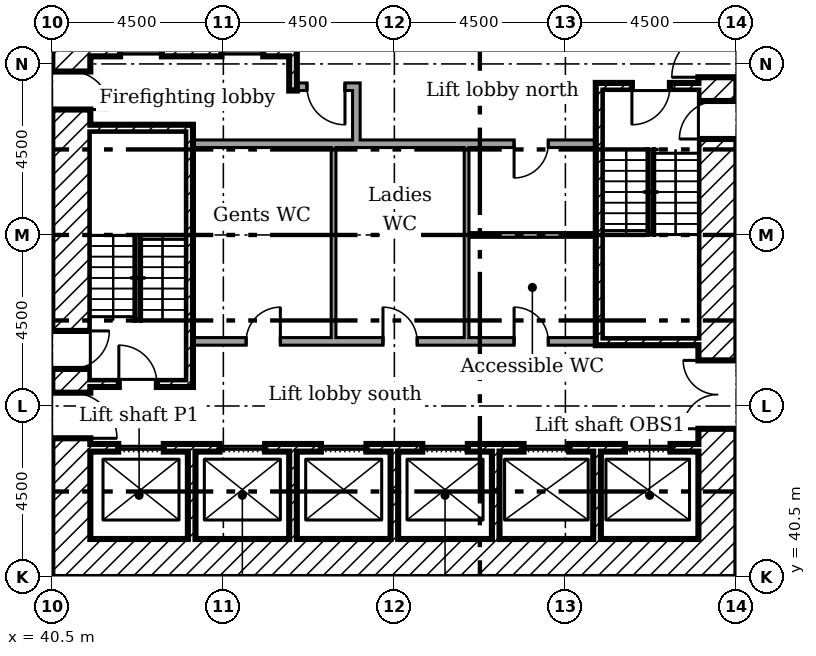
"""IFC4 building model, lengths in metres.
Left out: names, types, materials, properties, quantities, classifications, styles, units other than length and angle.
Written with IfcOpenShell. Run it as: python <this file> out.ifc"""

import sys

from ifc_helpers import new_model, si_unit, direction, frame, frame_2d, origin, place, context, subcontext, project, spatial, rectangle, extrude, element, fill, save


model = new_model("IFC4")
c1 = context("Model", 3, precision=1e-05, world=origin(), true_north=direction((0.0, 1.0)))
c2 = subcontext(c1, "Body", "Model", "MODEL_VIEW")
j1 = project(units=[si_unit("LENGTHUNIT", "METRE"), si_unit("PLANEANGLEUNIT", "RADIAN")], contexts=[c1])
p1 = place(None, origin())
s1 = spatial("IfcSite", under=j1, at=p1, CompositionType="ELEMENT")
p2 = place(p1, origin())
s2 = spatial("IfcBuilding", under=s1, at=p2, CompositionType="ELEMENT")
p3 = place(p2, origin())
s3 = spatial("IfcBuildingStorey", under=s2, at=p3, CompositionType="ELEMENT", Elevation=0.0)
p4 = place(p3, frame((58.0, 40.5, 0.0), z_axis=(0.0, 0.0, 1.0), x_axis=(0.0, 1.0, 0.0)))
e1 = element("IfcWall", 1, at=p4, inside=s3, PredefinedType="SHEAR", context=c2, shape_type="SweptSolid", body=[
    extrude(rectangle(XDim=18.0, YDim=1.0, at=frame_2d((9.0, 0.0))), origin(), (0.0, 0.0, 1.0), 5.5),
])
p5 = place(p4, frame((13.15, 0.0, 0.0)))
e2 = element("IfcOpeningElement", 2, at=p5, cuts=e1, PredefinedType="OPENING", context=c2, shape_type="SweptSolid", body=[
    extrude(rectangle(XDim=1.2, YDim=2.1, at=frame_2d((0.6, 1.05))), frame((0.0, 0.51, 0.0), z_axis=(0.0, -1.0, 0.0), x_axis=(1.0, 0.0, 0.0)), (0.0, 0.0, 1.0), 1.02),
])
p6 = place(p4, frame((3.9, 0.0, 0.0)))
e3 = element("IfcOpeningElement", 3, at=p6, cuts=e1, PredefinedType="OPENING", context=c2, shape_type="SweptSolid", body=[
    extrude(rectangle(XDim=1.8, YDim=2.1, at=frame_2d((0.9, 1.05))), frame((0.0, 0.51, 0.0), z_axis=(0.0, -1.0, 0.0), x_axis=(1.0, 0.0, 0.0)), (0.0, 0.0, 1.0), 1.02),
])
p7 = place(p4, frame((11.525, 0.0, 0.0)))
e4 = element("IfcOpeningElement", 4, at=p7, cuts=e1, PredefinedType="OPENING", context=c2, shape_type="SweptSolid", body=[
    extrude(rectangle(XDim=1.0, YDim=2.1, at=frame_2d((0.5, 1.05))), frame((0.0, 0.51, 0.0), z_axis=(0.0, -1.0, 0.0), x_axis=(1.0, 0.0, 0.0)), (0.0, 0.0, 1.0), 1.02),
])
p8 = place(p3, frame((41.5, 41.0, 0.0)))
e5 = element("IfcWall", 5, at=p8, inside=s3, PredefinedType="SHEAR", context=c2, shape_type="SweptSolid", body=[
    extrude(rectangle(XDim=16.0, YDim=1.0, at=frame_2d((8.0, 0.0))), origin(), (0.0, 0.0, 1.0), 5.5),
])
p9 = place(p3, frame((41.0, 40.5, 0.0), z_axis=(0.0, 0.0, 1.0), x_axis=(0.0, 1.0, 0.0)))
e6 = element("IfcWall", 6, at=p9, inside=s3, PredefinedType="SHEAR", context=c2, shape_type="SweptSolid", body=[
    extrude(rectangle(XDim=18.0, YDim=1.0, at=frame_2d((9.0, 0.0))), origin(), (0.0, 0.0, 1.0), 5.5),
])
p10 = place(p9, frame((3.65, 0.0, 0.0)))
e7 = element("IfcOpeningElement", 7, at=p10, cuts=e6, PredefinedType="OPENING", context=c2, shape_type="SweptSolid", body=[
    extrude(rectangle(XDim=1.2, YDim=2.1, at=frame_2d((0.6, 1.05))), frame((0.0, 0.51, 0.0), z_axis=(0.0, -1.0, 0.0), x_axis=(1.0, 0.0, 0.0)), (0.0, 0.0, 1.0), 1.02),
])
p11 = place(p9, frame((5.475, 0.0, 0.0)))
e8 = element("IfcOpeningElement", 8, at=p11, cuts=e6, PredefinedType="OPENING", context=c2, shape_type="SweptSolid", body=[
    extrude(rectangle(XDim=1.0, YDim=2.1, at=frame_2d((0.5, 1.05))), frame((0.0, 0.51, 0.0), z_axis=(0.0, -1.0, 0.0), x_axis=(1.0, 0.0, 0.0)), (0.0, 0.0, 1.0), 1.02),
])
p12 = place(p9, frame((12.3, 0.0, 0.0)))
e9 = element("IfcOpeningElement", 9, at=p12, cuts=e6, PredefinedType="OPENING", context=c2, shape_type="SweptSolid", body=[
    extrude(rectangle(XDim=1.0, YDim=2.1, at=frame_2d((0.5, 1.05))), frame((0.0, 0.51, 0.0), z_axis=(0.0, -1.0, 0.0), x_axis=(1.0, 0.0, 0.0)), (0.0, 0.0, 1.0), 1.02),
])
p13 = place(p3, frame((46.833, 57.5, 0.0), z_axis=(0.0, 0.0, 1.0), x_axis=(0.0, -1.0, 0.0)))
e10 = element("IfcWall", 10, at=p13, inside=s3, PredefinedType="SHEAR", context=c2, shape_type="SweptSolid", body=[
    extrude(rectangle(XDim=4.2, YDim=0.2, at=frame_2d((2.1, 0.0))), origin(), (0.0, 0.0, 1.0), 5.5),
])
for number, where, z_axis, x_axis in (
    (11, (44.167, 41.5, 0.0), (0.0, 0.0, 1.0), (0.0, 1.0, 0.0)),
    (12, (46.833, 41.5, 0.0), (0.0, 0.0, 1.0), (0.0, 1.0, 0.0)),
    (13, (49.5, 41.5, 0.0), (0.0, 0.0, 1.0), (0.0, 1.0, 0.0)),
    (14, (52.167, 41.5, 0.0), (0.0, 0.0, 1.0), (0.0, 1.0, 0.0)),
    (15, (54.833, 41.5, 0.0), (0.0, 0.0, 1.0), (0.0, 1.0, 0.0)),
):
    element("IfcWall", number, at=place(p3, frame(where, z_axis=z_axis, x_axis=x_axis)), inside=s3, PredefinedType="SHEAR", context=c2, shape_type="SweptSolid", body=[
        extrude(rectangle(XDim=2.3, YDim=0.2, at=frame_2d((1.15, 0.0))), origin(), (0.0, 0.0, 1.0), 5.5),
    ])
p14 = place(p3, frame((48.5, 51.9, 0.0), z_axis=(0.0, 0.0, 1.0), x_axis=(0.0, 1.0, 0.0)))
e16 = element("IfcWall", 16, at=p14, inside=s3, PredefinedType="PARTITIONING", context=c2, shape_type="SweptSolid", body=[
    extrude(rectangle(XDim=1.6, YDim=0.2, at=frame_2d((0.8, 0.0))), origin(), (0.0, 0.0, 1.0), 5.5),
])
p15 = place(p3, frame((46.933, 53.4, 0.0)))
e17 = element("IfcWall", 17, at=p15, inside=s3, PredefinedType="PARTITIONING", context=c2, shape_type="SweptSolid", body=[
    extrude(rectangle(XDim=1.467, YDim=0.2, at=frame_2d((0.733, 0.0))), origin(), (0.0, 0.0, 1.0), 5.5),
])
p16 = place(p15, frame((0.267, 0.0, 0.0)))
e18 = element("IfcOpeningElement", 18, at=p16, cuts=e17, PredefinedType="OPENING", context=c2, shape_type="SweptSolid", body=[
    extrude(rectangle(XDim=1.0, YDim=2.1, at=frame_2d((0.5, 1.05))), frame((0.0, 0.11, 0.0), z_axis=(0.0, -1.0, 0.0), x_axis=(1.0, 0.0, 0.0)), (0.0, 0.0, 1.0), 0.22),
])
p17 = place(p3, frame((41.5, 54.3, 0.0)))
e19 = element("IfcWall", 19, at=p17, inside=s3, PredefinedType="SHEAR", context=c2, shape_type="SweptSolid", body=[
    extrude(rectangle(XDim=5.233, YDim=0.2, at=frame_2d((2.617, 0.0))), origin(), (0.0, 0.0, 1.0), 5.5),
])
p18 = place(p17, frame((0.783, 0.0, 0.0)))
e20 = element("IfcOpeningElement", 20, at=p18, cuts=e19, PredefinedType="OPENING", context=c2, shape_type="SweptSolid", body=[
    extrude(rectangle(XDim=1.1, YDim=2.1, at=frame_2d((0.55, 1.05))), frame((0.0, 0.11, 0.0), z_axis=(0.0, -1.0, 0.0), x_axis=(1.0, 0.0, 0.0)), (0.0, 0.0, 1.0), 0.22),
])
p19 = place(p17, frame((3.45, 0.0, 0.0)))
e21 = element("IfcOpeningElement", 21, at=p19, cuts=e19, PredefinedType="OPENING", context=c2, shape_type="SweptSolid", body=[
    extrude(rectangle(XDim=1.1, YDim=2.1, at=frame_2d((0.55, 1.05))), frame((0.0, 0.11, 0.0), z_axis=(0.0, -1.0, 0.0), x_axis=(1.0, 0.0, 0.0)), (0.0, 0.0, 1.0), 0.22),
])
p20 = place(p3, frame((41.5, 43.9, 0.0)))
e22 = element("IfcWall", 22, at=p20, inside=s3, PredefinedType="SHEAR", context=c2, shape_type="SweptSolid", body=[
    extrude(rectangle(XDim=16.0, YDim=0.2, at=frame_2d((8.0, 0.0))), origin(), (0.0, 0.0, 1.0), 5.5),
])
p21 = place(p20, frame((14.067, 0.0, 0.0)))
e23 = element("IfcOpeningElement", 23, at=p21, cuts=e22, PredefinedType="OPENING", context=c2, shape_type="SweptSolid", body=[
    extrude(rectangle(XDim=1.2, YDim=2.1, at=frame_2d((0.6, 1.05))), frame((0.0, 0.11, 0.0), z_axis=(0.0, -1.0, 0.0), x_axis=(1.0, 0.0, 0.0)), (0.0, 0.0, 1.0), 0.22),
])
p22 = place(p20, frame((0.733, 0.0, 0.0)))
e24 = element("IfcOpeningElement", 24, at=p22, cuts=e22, PredefinedType="OPENING", context=c2, shape_type="SweptSolid", body=[
    extrude(rectangle(XDim=1.2, YDim=2.1, at=frame_2d((0.6, 1.05))), frame((0.0, 0.11, 0.0), z_axis=(0.0, -1.0, 0.0), x_axis=(1.0, 0.0, 0.0)), (0.0, 0.0, 1.0), 0.22),
])
p23 = place(p20, frame((3.4, 0.0, 0.0)))
e25 = element("IfcOpeningElement", 25, at=p23, cuts=e22, PredefinedType="OPENING", context=c2, shape_type="SweptSolid", body=[
    extrude(rectangle(XDim=1.2, YDim=2.1, at=frame_2d((0.6, 1.05))), frame((0.0, 0.11, 0.0), z_axis=(0.0, -1.0, 0.0), x_axis=(1.0, 0.0, 0.0)), (0.0, 0.0, 1.0), 0.22),
])
p24 = place(p20, frame((6.067, 0.0, 0.0)))
e26 = element("IfcOpeningElement", 26, at=p24, cuts=e22, PredefinedType="OPENING", context=c2, shape_type="SweptSolid", body=[
    extrude(rectangle(XDim=1.2, YDim=2.1, at=frame_2d((0.6, 1.05))), frame((0.0, 0.11, 0.0), z_axis=(0.0, -1.0, 0.0), x_axis=(1.0, 0.0, 0.0)), (0.0, 0.0, 1.0), 0.22),
])
p25 = place(p20, frame((8.733, 0.0, 0.0)))
e27 = element("IfcOpeningElement", 27, at=p25, cuts=e22, PredefinedType="OPENING", context=c2, shape_type="SweptSolid", body=[
    extrude(rectangle(XDim=1.2, YDim=2.1, at=frame_2d((0.6, 1.05))), frame((0.0, 0.11, 0.0), z_axis=(0.0, -1.0, 0.0), x_axis=(1.0, 0.0, 0.0)), (0.0, 0.0, 1.0), 0.22),
])
p26 = place(p20, frame((11.4, 0.0, 0.0)))
e28 = element("IfcOpeningElement", 28, at=p26, cuts=e22, PredefinedType="OPENING", context=c2, shape_type="SweptSolid", body=[
    extrude(rectangle(XDim=1.2, YDim=2.1, at=frame_2d((0.6, 1.05))), frame((0.0, 0.11, 0.0), z_axis=(0.0, -1.0, 0.0), x_axis=(1.0, 0.0, 0.0)), (0.0, 0.0, 1.0), 0.22),
])
p27 = place(p3, frame((44.1, 45.5, 0.0), z_axis=(0.0, 0.0, 1.0), x_axis=(0.0, 1.0, 0.0)))
e29 = element("IfcWall", 29, at=p27, inside=s3, PredefinedType="SHEAR", context=c2, shape_type="SweptSolid", body=[
    extrude(rectangle(XDim=6.9, YDim=0.2, at=frame_2d((3.45, 0.0))), origin(), (0.0, 0.0, 1.0), 5.5),
])
p28 = place(p3, frame((41.5, 52.3, 0.0)))
e30 = element("IfcWall", 30, at=p28, inside=s3, PredefinedType="SHEAR", context=c2, shape_type="SweptSolid", body=[
    extrude(rectangle(XDim=2.5, YDim=0.2, at=frame_2d((1.25, 0.0))), origin(), (0.0, 0.0, 1.0), 5.5),
])
p29 = place(p3, frame((41.5, 45.6, 0.0)))
e31 = element("IfcWall", 31, at=p29, inside=s3, PredefinedType="SHEAR", context=c2, shape_type="SweptSolid", body=[
    extrude(rectangle(XDim=2.5, YDim=0.2, at=frame_2d((1.25, 0.0))), origin(), (0.0, 0.0, 1.0), 5.5),
])
p30 = place(p29, frame((0.75, 0.0, 0.0)))
e32 = element("IfcOpeningElement", 32, at=p30, cuts=e31, PredefinedType="OPENING", context=c2, shape_type="SweptSolid", body=[
    extrude(rectangle(XDim=1.0, YDim=2.1, at=frame_2d((0.5, 1.05))), frame((0.0, 0.11, 0.0), z_axis=(0.0, -1.0, 0.0), x_axis=(1.0, 0.0, 0.0)), (0.0, 0.0, 1.0), 0.22),
])
p31 = place(p3, frame((54.8, 53.4, 0.0)))
e33 = element("IfcWall", 33, at=p31, inside=s3, PredefinedType="SHEAR", context=c2, shape_type="SweptSolid", body=[
    extrude(rectangle(XDim=2.7, YDim=0.2, at=frame_2d((1.35, 0.0))), origin(), (0.0, 0.0, 1.0), 5.5),
])
p32 = place(p31, frame((0.95, 0.0, 0.0)))
e34 = element("IfcOpeningElement", 34, at=p32, cuts=e33, PredefinedType="OPENING", context=c2, shape_type="SweptSolid", body=[
    extrude(rectangle(XDim=1.0, YDim=2.1, at=frame_2d((0.5, 1.05))), frame((0.0, 0.11, 0.0), z_axis=(0.0, -1.0, 0.0), x_axis=(1.0, 0.0, 0.0)), (0.0, 0.0, 1.0), 0.22),
])
p33 = place(p3, frame((54.8, 46.7, 0.0)))
e35 = element("IfcWall", 35, at=p33, inside=s3, PredefinedType="SHEAR", context=c2, shape_type="SweptSolid", body=[
    extrude(rectangle(XDim=2.7, YDim=0.2, at=frame_2d((1.35, 0.0))), origin(), (0.0, 0.0, 1.0), 5.5),
])
p34 = place(p3, frame((54.9, 46.8, 0.0), z_axis=(0.0, 0.0, 1.0), x_axis=(0.0, 1.0, 0.0)))
e36 = element("IfcWall", 36, at=p34, inside=s3, PredefinedType="SHEAR", context=c2, shape_type="SweptSolid", body=[
    extrude(rectangle(XDim=6.5, YDim=0.2, at=frame_2d((3.25, 0.0))), origin(), (0.0, 0.0, 1.0), 5.5),
])
p35 = place(p3, frame((44.2, 51.9, 0.0)))
e37 = element("IfcWall", 37, at=p35, inside=s3, PredefinedType="PARTITIONING", context=c2, shape_type="SweptSolid", body=[
    extrude(rectangle(XDim=10.6, YDim=0.2, at=frame_2d((5.3, 0.0))), origin(), (0.0, 0.0, 1.0), 5.5),
])
p36 = place(p35, frame((8.45, 0.0, 0.0)))
e38 = element("IfcOpeningElement", 38, at=p36, cuts=e37, PredefinedType="OPENING", context=c2, shape_type="SweptSolid", body=[
    extrude(rectangle(XDim=0.9, YDim=2.1, at=frame_2d((0.45, 1.05))), frame((0.0, 0.11, 0.0), z_axis=(0.0, -1.0, 0.0), x_axis=(1.0, 0.0, 0.0)), (0.0, 0.0, 1.0), 0.22),
])
p37 = place(p3, frame((44.2, 46.7, 0.0)))
e39 = element("IfcWall", 39, at=p37, inside=s3, PredefinedType="PARTITIONING", context=c2, shape_type="SweptSolid", body=[
    extrude(rectangle(XDim=10.6, YDim=0.2, at=frame_2d((5.3, 0.0))), origin(), (0.0, 0.0, 1.0), 5.5),
])
p38 = place(p37, frame((1.4, 0.0, 0.0)))
e40 = element("IfcOpeningElement", 40, at=p38, cuts=e39, PredefinedType="OPENING", context=c2, shape_type="SweptSolid", body=[
    extrude(rectangle(XDim=0.9, YDim=2.1, at=frame_2d((0.45, 1.05))), frame((0.0, 0.11, 0.0), z_axis=(0.0, -1.0, 0.0), x_axis=(1.0, 0.0, 0.0)), (0.0, 0.0, 1.0), 0.22),
])
p39 = place(p37, frame((5.0, 0.0, 0.0)))
e41 = element("IfcOpeningElement", 41, at=p39, cuts=e39, PredefinedType="OPENING", context=c2, shape_type="SweptSolid", body=[
    extrude(rectangle(XDim=0.9, YDim=2.1, at=frame_2d((0.45, 1.05))), frame((0.0, 0.11, 0.0), z_axis=(0.0, -1.0, 0.0), x_axis=(1.0, 0.0, 0.0)), (0.0, 0.0, 1.0), 0.22),
])
p40 = place(p37, frame((8.45, 0.0, 0.0)))
e42 = element("IfcOpeningElement", 42, at=p40, cuts=e39, PredefinedType="OPENING", context=c2, shape_type="SweptSolid", body=[
    extrude(rectangle(XDim=0.9, YDim=2.1, at=frame_2d((0.45, 1.05))), frame((0.0, 0.11, 0.0), z_axis=(0.0, -1.0, 0.0), x_axis=(1.0, 0.0, 0.0)), (0.0, 0.0, 1.0), 0.22),
])
p41 = place(p3, frame((47.9, 46.8, 0.0), z_axis=(0.0, 0.0, 1.0), x_axis=(0.0, 1.0, 0.0)))
e43 = element("IfcWall", 43, at=p41, inside=s3, PredefinedType="PARTITIONING", context=c2, shape_type="SweptSolid", body=[
    extrude(rectangle(XDim=5.0, YDim=0.125, at=frame_2d((2.5, 0.0))), origin(), (0.0, 0.0, 1.0), 5.5),
])
p42 = place(p3, frame((51.4, 46.8, 0.0), z_axis=(0.0, 0.0, 1.0), x_axis=(0.0, 1.0, 0.0)))
e44 = element("IfcWall", 44, at=p42, inside=s3, PredefinedType="PARTITIONING", context=c2, shape_type="SweptSolid", body=[
    extrude(rectangle(XDim=2.762, YDim=0.125, at=frame_2d((1.381, 0.0))), origin(), (0.0, 0.0, 1.0), 5.5),
])
p43 = place(p3, frame((54.8, 49.5, 0.0), z_axis=(0.0, 0.0, 1.0), x_axis=(-1.0, 0.0, 0.0)))
e45 = element("IfcWall", 45, at=p43, inside=s3, PredefinedType="PARTITIONING", context=c2, shape_type="SweptSolid", body=[
    extrude(rectangle(XDim=3.338, YDim=0.125, at=frame_2d((1.669, 0.0))), origin(), (0.0, 0.0, 1.0), 5.5),
])
p44 = place(p3, frame((51.4, 49.5, 0.0), z_axis=(0.0, 0.0, 1.0), x_axis=(0.0, 1.0, 0.0)))
e46 = element("IfcWall", 46, at=p44, inside=s3, PredefinedType="PARTITIONING", context=c2, shape_type="SweptSolid", body=[
    extrude(rectangle(XDim=2.3, YDim=0.125, at=frame_2d((1.15, 0.0))), origin(), (0.0, 0.0, 1.0), 5.5),
])
p45 = place(p5, origin())
e47 = element("IfcDoor", 47, at=p45, inside=s3, OperationType="SINGLE_SWING_RIGHT", PredefinedType="DOOR", context=c2, shape_type="SweptSolid", body=[
    extrude(rectangle(XDim=1.2, YDim=2.1, at=frame_2d((0.6, 1.05))), frame((0.0, 0.025, 0.0), z_axis=(0.0, -1.0, 0.0), x_axis=(1.0, 0.0, 0.0)), (0.0, 0.0, 1.0), 0.05),
])
fill(e2, e47)
p46 = place(p6, origin())
e48 = element("IfcDoor", 48, at=p46, inside=s3, OperationType="DOUBLE_DOOR_SINGLE_SWING", PredefinedType="DOOR", context=c2, shape_type="SweptSolid", body=[
    extrude(rectangle(XDim=1.8, YDim=2.1, at=frame_2d((0.9, 1.05))), frame((0.0, 0.025, 0.0), z_axis=(0.0, -1.0, 0.0), x_axis=(1.0, 0.0, 0.0)), (0.0, 0.0, 1.0), 0.05),
])
fill(e3, e48)
p47 = place(p10, frame((1.2, 0.0, 0.0), x_axis=(-1.0, 0.0, 0.0)))
e49 = element("IfcDoor", 49, at=p47, inside=s3, OperationType="SINGLE_SWING_LEFT", PredefinedType="DOOR", context=c2, shape_type="SweptSolid", body=[
    extrude(rectangle(XDim=1.2, YDim=2.1, at=frame_2d((0.6, 1.05))), frame((0.0, 0.025, 0.0), z_axis=(0.0, -1.0, 0.0), x_axis=(1.0, 0.0, 0.0)), (0.0, 0.0, 1.0), 0.05),
])
fill(e7, e49)
p48 = place(p30, origin())
e50 = element("IfcDoor", 50, at=p48, inside=s3, OperationType="SINGLE_SWING_RIGHT", PredefinedType="DOOR", context=c2, shape_type="SweptSolid", body=[
    extrude(rectangle(XDim=1.0, YDim=2.1, at=frame_2d((0.5, 1.05))), frame((0.0, 0.025, 0.0), z_axis=(0.0, -1.0, 0.0), x_axis=(1.0, 0.0, 0.0)), (0.0, 0.0, 1.0), 0.05),
])
fill(e32, e50)
p49 = place(p11, frame((1.0, 0.0, 0.0), x_axis=(-1.0, 0.0, 0.0)))
e51 = element("IfcDoor", 51, at=p49, inside=s3, OperationType="SINGLE_SWING_RIGHT", PredefinedType="DOOR", context=c2, shape_type="SweptSolid", body=[
    extrude(rectangle(XDim=1.0, YDim=2.1, at=frame_2d((0.5, 1.05))), frame((0.0, 0.025, 0.0), z_axis=(0.0, -1.0, 0.0), x_axis=(1.0, 0.0, 0.0)), (0.0, 0.0, 1.0), 0.05),
])
fill(e8, e51)
p50 = place(p32, frame((1.0, 0.0, 0.0), x_axis=(-1.0, 0.0, 0.0)))
e52 = element("IfcDoor", 52, at=p50, inside=s3, OperationType="SINGLE_SWING_LEFT", PredefinedType="DOOR", context=c2, shape_type="SweptSolid", body=[
    extrude(rectangle(XDim=1.0, YDim=2.1, at=frame_2d((0.5, 1.05))), frame((0.0, 0.025, 0.0), z_axis=(0.0, -1.0, 0.0), x_axis=(1.0, 0.0, 0.0)), (0.0, 0.0, 1.0), 0.05),
])
fill(e34, e52)
p51 = place(p7, origin())
e53 = element("IfcDoor", 53, at=p51, inside=s3, OperationType="SINGLE_SWING_RIGHT", PredefinedType="DOOR", context=c2, shape_type="SweptSolid", body=[
    extrude(rectangle(XDim=1.0, YDim=2.1, at=frame_2d((0.5, 1.05))), frame((0.0, 0.025, 0.0), z_axis=(0.0, -1.0, 0.0), x_axis=(1.0, 0.0, 0.0)), (0.0, 0.0, 1.0), 0.05),
])
fill(e4, e53)
p52 = place(p16, frame((1.0, 0.0, 0.0), x_axis=(-1.0, 0.0, 0.0)))
e54 = element("IfcDoor", 54, at=p52, inside=s3, OperationType="SINGLE_SWING_RIGHT", PredefinedType="DOOR", context=c2, shape_type="SweptSolid", body=[
    extrude(rectangle(XDim=1.0, YDim=2.1, at=frame_2d((0.5, 1.05))), frame((0.0, 0.025, 0.0), z_axis=(0.0, -1.0, 0.0), x_axis=(1.0, 0.0, 0.0)), (0.0, 0.0, 1.0), 0.05),
])
fill(e18, e54)
p53 = place(p12, frame((1.0, 0.0, 0.0), x_axis=(-1.0, 0.0, 0.0)))
e55 = element("IfcDoor", 55, at=p53, inside=s3, OperationType="SINGLE_SWING_LEFT", PredefinedType="DOOR", context=c2, shape_type="SweptSolid", body=[
    extrude(rectangle(XDim=1.0, YDim=2.1, at=frame_2d((0.5, 1.05))), frame((0.0, 0.025, 0.0), z_axis=(0.0, -1.0, 0.0), x_axis=(1.0, 0.0, 0.0)), (0.0, 0.0, 1.0), 0.05),
])
fill(e9, e55)
p54 = place(p38, origin())
e56 = element("IfcDoor", 56, at=p54, inside=s3, OperationType="SINGLE_SWING_LEFT", PredefinedType="DOOR", context=c2, shape_type="SweptSolid", body=[
    extrude(rectangle(XDim=0.9, YDim=2.1, at=frame_2d((0.45, 1.05))), frame((0.0, 0.025, 0.0), z_axis=(0.0, -1.0, 0.0), x_axis=(1.0, 0.0, 0.0)), (0.0, 0.0, 1.0), 0.05),
])
fill(e40, e56)
p55 = place(p39, origin())
e57 = element("IfcDoor", 57, at=p55, inside=s3, OperationType="SINGLE_SWING_RIGHT", PredefinedType="DOOR", context=c2, shape_type="SweptSolid", body=[
    extrude(rectangle(XDim=0.9, YDim=2.1, at=frame_2d((0.45, 1.05))), frame((0.0, 0.025, 0.0), z_axis=(0.0, -1.0, 0.0), x_axis=(1.0, 0.0, 0.0)), (0.0, 0.0, 1.0), 0.05),
])
fill(e41, e57)
p56 = place(p40, origin())
e58 = element("IfcDoor", 58, at=p56, inside=s3, OperationType="SINGLE_SWING_RIGHT", PredefinedType="DOOR", context=c2, shape_type="SweptSolid", body=[
    extrude(rectangle(XDim=0.9, YDim=2.1, at=frame_2d((0.45, 1.05))), frame((0.0, 0.025, 0.0), z_axis=(0.0, -1.0, 0.0), x_axis=(1.0, 0.0, 0.0)), (0.0, 0.0, 1.0), 0.05),
])
fill(e42, e58)
p57 = place(p36, frame((0.9, 0.0, 0.0), x_axis=(-1.0, 0.0, 0.0)))
e59 = element("IfcDoor", 59, at=p57, inside=s3, OperationType="SINGLE_SWING_LEFT", PredefinedType="DOOR", context=c2, shape_type="SweptSolid", body=[
    extrude(rectangle(XDim=0.9, YDim=2.1, at=frame_2d((0.45, 1.05))), frame((0.0, 0.025, 0.0), z_axis=(0.0, -1.0, 0.0), x_axis=(1.0, 0.0, 0.0)), (0.0, 0.0, 1.0), 0.05),
])
fill(e38, e59)
p58 = place(p18, origin())
e60 = element("IfcDoor", 60, at=p58, inside=s3, OperationType="SLIDING_TO_LEFT", PredefinedType="DOOR", context=c2, shape_type="SweptSolid", body=[
    extrude(rectangle(XDim=1.1, YDim=2.1, at=frame_2d((0.55, 1.05))), frame((0.0, 0.025, 0.0), z_axis=(0.0, -1.0, 0.0), x_axis=(1.0, 0.0, 0.0)), (0.0, 0.0, 1.0), 0.05),
])
fill(e20, e60)
p59 = place(p19, origin())
e61 = element("IfcDoor", 61, at=p59, inside=s3, OperationType="SLIDING_TO_LEFT", PredefinedType="DOOR", context=c2, shape_type="SweptSolid", body=[
    extrude(rectangle(XDim=1.1, YDim=2.1, at=frame_2d((0.55, 1.05))), frame((0.0, 0.025, 0.0), z_axis=(0.0, -1.0, 0.0), x_axis=(1.0, 0.0, 0.0)), (0.0, 0.0, 1.0), 0.05),
])
fill(e21, e61)
p60 = place(p21, origin())
e62 = element("IfcDoor", 62, at=p60, inside=s3, OperationType="SLIDING_TO_LEFT", PredefinedType="DOOR", context=c2, shape_type="SweptSolid", body=[
    extrude(rectangle(XDim=1.2, YDim=2.1, at=frame_2d((0.6, 1.05))), frame((0.0, 0.025, 0.0), z_axis=(0.0, -1.0, 0.0), x_axis=(1.0, 0.0, 0.0)), (0.0, 0.0, 1.0), 0.05),
])
fill(e23, e62)
p61 = place(p22, origin())
e63 = element("IfcDoor", 63, at=p61, inside=s3, OperationType="SLIDING_TO_LEFT", PredefinedType="DOOR", context=c2, shape_type="SweptSolid", body=[
    extrude(rectangle(XDim=1.2, YDim=2.1, at=frame_2d((0.6, 1.05))), frame((0.0, 0.025, 0.0), z_axis=(0.0, -1.0, 0.0), x_axis=(1.0, 0.0, 0.0)), (0.0, 0.0, 1.0), 0.05),
])
fill(e24, e63)
p62 = place(p23, origin())
e64 = element("IfcDoor", 64, at=p62, inside=s3, OperationType="SLIDING_TO_LEFT", PredefinedType="DOOR", context=c2, shape_type="SweptSolid", body=[
    extrude(rectangle(XDim=1.2, YDim=2.1, at=frame_2d((0.6, 1.05))), frame((0.0, 0.025, 0.0), z_axis=(0.0, -1.0, 0.0), x_axis=(1.0, 0.0, 0.0)), (0.0, 0.0, 1.0), 0.05),
])
fill(e25, e64)
p63 = place(p24, origin())
e65 = element("IfcDoor", 65, at=p63, inside=s3, OperationType="SLIDING_TO_LEFT", PredefinedType="DOOR", context=c2, shape_type="SweptSolid", body=[
    extrude(rectangle(XDim=1.2, YDim=2.1, at=frame_2d((0.6, 1.05))), frame((0.0, 0.025, 0.0), z_axis=(0.0, -1.0, 0.0), x_axis=(1.0, 0.0, 0.0)), (0.0, 0.0, 1.0), 0.05),
])
fill(e26, e65)
p64 = place(p25, origin())
e66 = element("IfcDoor", 66, at=p64, inside=s3, OperationType="SLIDING_TO_LEFT", PredefinedType="DOOR", context=c2, shape_type="SweptSolid", body=[
    extrude(rectangle(XDim=1.2, YDim=2.1, at=frame_2d((0.6, 1.05))), frame((0.0, 0.025, 0.0), z_axis=(0.0, -1.0, 0.0), x_axis=(1.0, 0.0, 0.0)), (0.0, 0.0, 1.0), 0.05),
])
fill(e27, e66)
p65 = place(p26, origin())
e67 = element("IfcDoor", 67, at=p65, inside=s3, OperationType="SLIDING_TO_LEFT", PredefinedType="DOOR", context=c2, shape_type="SweptSolid", body=[
    extrude(rectangle(XDim=1.2, YDim=2.1, at=frame_2d((0.6, 1.05))), frame((0.0, 0.025, 0.0), z_axis=(0.0, -1.0, 0.0), x_axis=(1.0, 0.0, 0.0)), (0.0, 0.0, 1.0), 0.05),
])
fill(e28, e67)
save(model, sys.argv[1])
